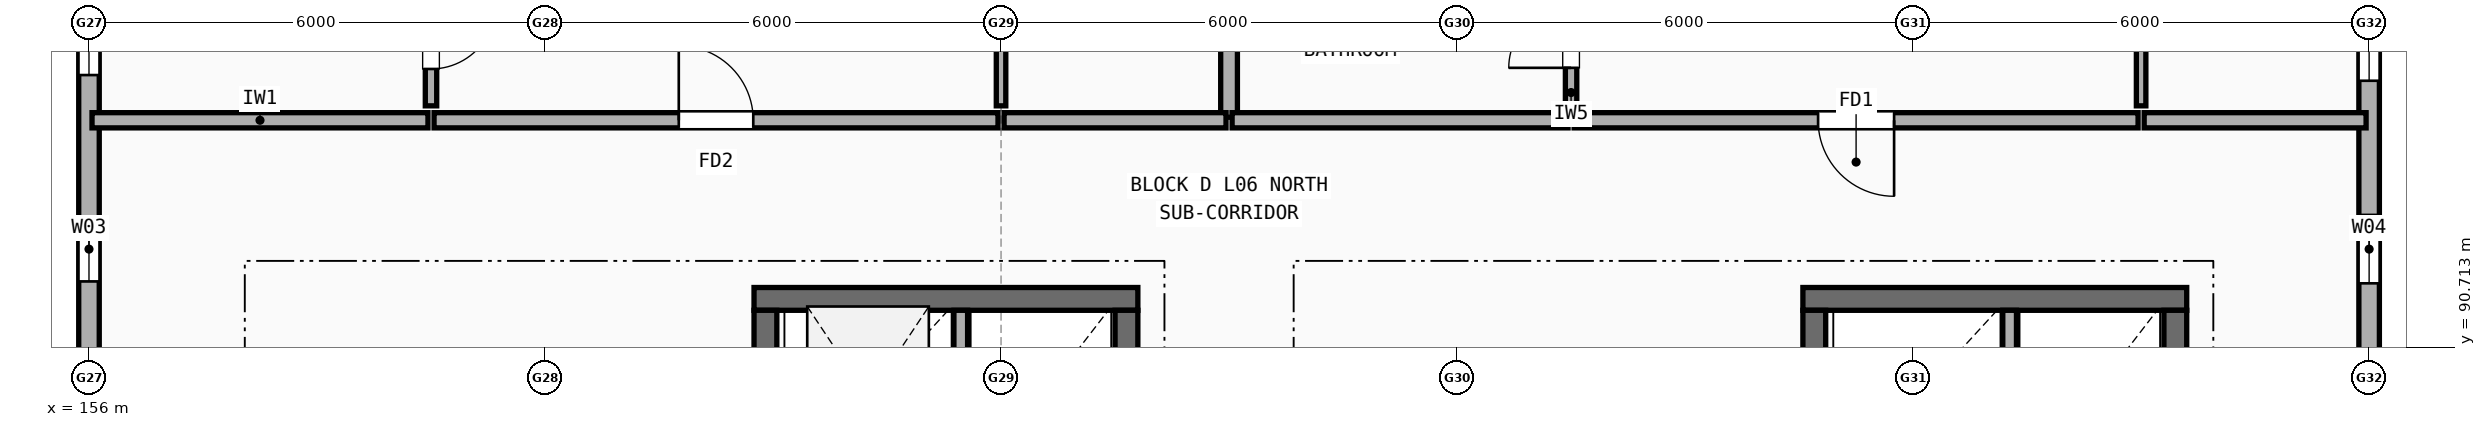
"""IFC4 building model, lengths in metres.
Left out: names, types, materials, properties, quantities, classifications, styles, units other than length and angle.
Written with IfcOpenShell. Run it as: python <this file> out.ifc"""

import sys

from ifc_helpers import new_model, si_unit, direction, frame, frame_2d, origin, place, context, subcontext, project, spatial, rectangle, extrude, element, fill, save


model = new_model("IFC4")
c1 = context("Model", 3, precision=1e-05, world=origin(), true_north=direction((0.0, 1.0)))
c2 = subcontext(c1, "Body", "Model", "MODEL_VIEW")
j1 = project(units=[si_unit("LENGTHUNIT", "METRE"), si_unit("PLANEANGLEUNIT", "RADIAN")], contexts=[c1])
p1 = place(None, origin())
s1 = spatial("IfcSite", under=j1, at=p1, CompositionType="ELEMENT")
p2 = place(p1, origin())
s2 = spatial("IfcBuilding", under=s1, at=p2, CompositionType="ELEMENT")
p3 = place(p2, frame((0.0, 0.0, 20.5)))
s3 = spatial("IfcBuildingStorey", under=s2, at=p3, CompositionType="ELEMENT", Elevation=20.5)
p4 = place(p3, frame((186.0, 90.35, 0.0), z_axis=(0.0, 0.0, 1.0), x_axis=(0.0, 1.0, 0.0)))
e1 = element("IfcWall", 1, at=p4, inside=s3, PredefinedType="STANDARD", context=c2, shape_type="SweptSolid", body=[
    extrude(rectangle(XDim=5.3, YDim=0.27, at=frame_2d((2.65, 0.0))), origin(), (0.0, 0.0, 1.0), 2.452),
])
p5 = place(p4, frame((1.205, 0.0, 0.9)))
e2 = element("IfcOpeningElement", 2, at=p5, cuts=e1, PredefinedType="OPENING", context=c2, shape_type="SweptSolid", body=[
    extrude(rectangle(XDim=0.9, YDim=1.3, at=frame_2d((0.45, 0.65))), frame((0.0, 0.145, 0.0), z_axis=(0.0, -1.0, 0.0), x_axis=(1.0, 0.0, 0.0)), (0.0, 0.0, 1.0), 0.29),
])
p6 = place(p4, frame((3.87, 0.0, 0.9)))
e3 = element("IfcOpeningElement", 3, at=p6, cuts=e1, PredefinedType="OPENING", context=c2, shape_type="SweptSolid", body=[
    extrude(rectangle(XDim=0.95, YDim=1.35, at=frame_2d((0.475, 0.675))), frame((0.0, 0.145, 0.0), z_axis=(0.0, -1.0, 0.0), x_axis=(1.0, 0.0, 0.0)), (0.0, 0.0, 1.0), 0.29),
])
p7 = place(p3, frame((156.0, 95.65, 0.0), z_axis=(0.0, 0.0, 1.0), x_axis=(0.0, -1.0, 0.0)))
e4 = element("IfcWall", 4, at=p7, inside=s3, PredefinedType="STANDARD", context=c2, shape_type="SweptSolid", body=[
    extrude(rectangle(XDim=5.3, YDim=0.27, at=frame_2d((2.65, 0.0))), origin(), (0.0, 0.0, 1.0), 2.452),
])
p8 = place(p7, frame((0.555, 0.0, 0.9)))
e5 = element("IfcOpeningElement", 5, at=p8, cuts=e4, PredefinedType="OPENING", context=c2, shape_type="SweptSolid", body=[
    extrude(rectangle(XDim=0.8, YDim=1.2, at=frame_2d((0.4, 0.6))), frame((0.0, 0.145, 0.0), z_axis=(0.0, -1.0, 0.0), x_axis=(1.0, 0.0, 0.0)), (0.0, 0.0, 1.0), 0.29),
])
p9 = place(p7, frame((3.22, 0.0, 0.9)))
e6 = element("IfcOpeningElement", 6, at=p9, cuts=e4, PredefinedType="OPENING", context=c2, shape_type="SweptSolid", body=[
    extrude(rectangle(XDim=0.85, YDim=1.25, at=frame_2d((0.425, 0.625))), frame((0.0, 0.145, 0.0), z_axis=(0.0, -1.0, 0.0), x_axis=(1.0, 0.0, 0.0)), (0.0, 0.0, 1.0), 0.29),
])
p10 = place(p3, frame((169.8, 91.35, 0.0), z_axis=(0.0, 0.0, 1.0), x_axis=(-1.0, 0.0, 0.0)))
e7 = element("IfcWall", 7, at=p10, inside=s3, PredefinedType="SHEAR", context=c2, shape_type="SweptSolid", body=[
    extrude(rectangle(XDim=5.05, YDim=0.3, at=frame_2d((2.525, 0.0))), origin(), (0.0, 0.0, 1.0), 2.97),
])
p11 = place(p3, frame((169.65, 84.75, 0.0), z_axis=(0.0, 0.0, 1.0), x_axis=(0.0, 1.0, 0.0)))
e8 = element("IfcWall", 8, at=p11, inside=s3, PredefinedType="SHEAR", context=c2, shape_type="SweptSolid", body=[
    extrude(rectangle(XDim=6.45, YDim=0.3, at=frame_2d((3.225, 0.0))), origin(), (0.0, 0.0, 1.0), 2.97),
])
p12 = place(p3, frame((164.9, 87.75, 0.0), z_axis=(0.0, 0.0, 1.0), x_axis=(0.0, 1.0, 0.0)))
e9 = element("IfcWall", 9, at=p12, inside=s3, PredefinedType="SHEAR", context=c2, shape_type="SweptSolid", body=[
    extrude(rectangle(XDim=3.45, YDim=0.3, at=frame_2d((1.725, 0.0))), origin(), (0.0, 0.0, 1.0), 2.97),
])
p13 = place(p3, frame((167.47, 88.94, 0.0), z_axis=(0.0, 0.0, 1.0), x_axis=(0.0, 1.0, 0.0)))
e10 = element("IfcWall", 10, at=p13, inside=s3, PredefinedType="SOLIDWALL", context=c2, shape_type="SweptSolid", body=[
    extrude(rectangle(XDim=2.26, YDim=0.18, at=frame_2d((1.13, 0.0))), origin(), (0.0, 0.0, 1.0), 2.97),
])
p14 = place(p3, frame((183.6, 91.35, 0.0), z_axis=(0.0, 0.0, 1.0), x_axis=(-1.0, 0.0, 0.0)))
e11 = element("IfcWall", 11, at=p14, inside=s3, PredefinedType="SHEAR", context=c2, shape_type="SweptSolid", body=[
    extrude(rectangle(XDim=5.05, YDim=0.3, at=frame_2d((2.525, 0.0))), origin(), (0.0, 0.0, 1.0), 2.97),
])
p15 = place(p3, frame((183.45, 84.75, 0.0), z_axis=(0.0, 0.0, 1.0), x_axis=(0.0, 1.0, 0.0)))
e12 = element("IfcWall", 12, at=p15, inside=s3, PredefinedType="SHEAR", context=c2, shape_type="SweptSolid", body=[
    extrude(rectangle(XDim=6.45, YDim=0.3, at=frame_2d((3.225, 0.0))), origin(), (0.0, 0.0, 1.0), 2.97),
])
p16 = place(p3, frame((178.7, 87.65, 0.0), z_axis=(0.0, 0.0, 1.0), x_axis=(0.0, 1.0, 0.0)))
e13 = element("IfcWall", 13, at=p16, inside=s3, PredefinedType="SHEAR", context=c2, shape_type="SweptSolid", body=[
    extrude(rectangle(XDim=3.55, YDim=0.3, at=frame_2d((1.775, 0.0))), origin(), (0.0, 0.0, 1.0), 2.97),
])
p17 = place(p3, frame((181.27, 88.94, 0.0), z_axis=(0.0, 0.0, 1.0), x_axis=(0.0, 1.0, 0.0)))
e14 = element("IfcWall", 14, at=p17, inside=s3, PredefinedType="SOLIDWALL", context=c2, shape_type="SweptSolid", body=[
    extrude(rectangle(XDim=2.26, YDim=0.18, at=frame_2d((1.13, 0.0))), origin(), (0.0, 0.0, 1.0), 2.97),
])
p18 = place(p3, frame((171.0, 93.74, 0.0), z_axis=(0.0, 0.0, 1.0), x_axis=(0.0, 1.0, 0.0)))
e15 = element("IfcWall", 15, at=p18, inside=s3, PredefinedType="SOLIDWALL", context=c2, shape_type="SweptSolid", body=[
    extrude(rectangle(XDim=7.87, YDim=0.22, at=frame_2d((3.935, 0.0))), origin(), (0.0, 0.0, 1.0), 2.508),
])
p19 = place(p3, frame((156.04, 93.7, 0.0), z_axis=(0.0, 0.0, 1.0), x_axis=(1.0, 0.0, 0.0)))
e16 = element("IfcWall", 16, at=p19, inside=s3, PredefinedType="SOLIDWALL", context=c2, shape_type="SweptSolid", body=[
    extrude(rectangle(XDim=4.42, YDim=0.2, at=frame_2d((2.21, 0.0))), origin(), (0.0, 0.0, 1.0), 2.452),
])
p20 = place(p3, frame((160.54, 93.7, 0.0), z_axis=(0.0, 0.0, 1.0), x_axis=(1.0, 0.0, 0.0)))
e17 = element("IfcWall", 17, at=p20, inside=s3, PredefinedType="SOLIDWALL", context=c2, shape_type="SweptSolid", body=[
    extrude(rectangle(XDim=7.42, YDim=0.2, at=frame_2d((3.71, 0.0))), origin(), (0.0, 0.0, 1.0), 2.508),
])
p21 = place(p20, frame((3.22, 0.0, 0.0)))
e18 = element("IfcOpeningElement", 18, at=p21, cuts=e17, PredefinedType="OPENING", context=c2, shape_type="SweptSolid", body=[
    extrude(rectangle(XDim=0.98, YDim=2.15, at=frame_2d((0.49, 1.075))), frame((0.0, 0.11, 0.0), z_axis=(0.0, -1.0, 0.0), x_axis=(1.0, 0.0, 0.0)), (0.0, 0.0, 1.0), 0.22),
])
p22 = place(p3, frame((160.5, 93.89, 0.0), z_axis=(0.0, 0.0, 1.0), x_axis=(0.0, 1.0, 0.0)))
e19 = element("IfcWall", 19, at=p22, inside=s3, PredefinedType="PARTITIONING", context=c2, shape_type="SweptSolid", body=[
    extrude(rectangle(XDim=1.82, YDim=0.15, at=frame_2d((0.91, 0.0))), origin(), (0.0, 0.0, 1.0), 2.97),
])
p23 = place(p22, frame((0.485, 0.0, 0.0)))
e20 = element("IfcOpeningElement", 20, at=p23, cuts=e19, PredefinedType="OPENING", context=c2, shape_type="SweptSolid", body=[
    extrude(rectangle(XDim=0.85, YDim=2.1, at=frame_2d((0.425, 1.05))), frame((0.0, 0.085, 0.0), z_axis=(0.0, -1.0, 0.0), x_axis=(1.0, 0.0, 0.0)), (0.0, 0.0, 1.0), 0.17),
])
p24 = place(p3, frame((168.04, 93.7, 0.0), z_axis=(0.0, 0.0, 1.0), x_axis=(1.0, 0.0, 0.0)))
e21 = element("IfcWall", 21, at=p24, inside=s3, PredefinedType="SOLIDWALL", context=c2, shape_type="SweptSolid", body=[
    extrude(rectangle(XDim=2.92, YDim=0.2, at=frame_2d((1.46, 0.0))), origin(), (0.0, 0.0, 1.0), 2.508),
])
p25 = place(p3, frame((168.0, 93.89, 0.0), z_axis=(0.0, 0.0, 1.0), x_axis=(0.0, 1.0, 0.0)))
e22 = element("IfcWall", 22, at=p25, inside=s3, PredefinedType="PARTITIONING", context=c2, shape_type="SweptSolid", body=[
    extrude(rectangle(XDim=7.6, YDim=0.125, at=frame_2d((3.8, 0.0))), origin(), (0.0, 0.0, 1.0), 2.508),
])
p26 = place(p25, frame((3.65, 0.0, 0.0)))
e23 = element("IfcOpeningElement", 23, at=p26, cuts=e22, PredefinedType="OPENING", context=c2, shape_type="SweptSolid", body=[
    extrude(rectangle(XDim=0.88, YDim=2.1, at=frame_2d((0.44, 1.05))), frame((0.0, 0.073, 0.0), z_axis=(0.0, -1.0, 0.0), x_axis=(1.0, 0.0, 0.0)), (0.0, 0.0, 1.0), 0.145),
])
p27 = place(p3, frame((171.04, 93.7, 0.0), z_axis=(0.0, 0.0, 1.0), x_axis=(1.0, 0.0, 0.0)))
e24 = element("IfcWall", 24, at=p27, inside=s3, PredefinedType="SOLIDWALL", context=c2, shape_type="SweptSolid", body=[
    extrude(rectangle(XDim=4.42, YDim=0.2, at=frame_2d((2.21, 0.0))), origin(), (0.0, 0.0, 1.0), 2.97),
])
p28 = place(p3, frame((175.54, 93.7, 0.0), z_axis=(0.0, 0.0, 1.0), x_axis=(1.0, 0.0, 0.0)))
e25 = element("IfcWall", 25, at=p28, inside=s3, PredefinedType="SOLIDWALL", context=c2, shape_type="SweptSolid", body=[
    extrude(rectangle(XDim=7.42, YDim=0.2, at=frame_2d((3.71, 0.0))), origin(), (0.0, 0.0, 1.0), 2.97),
])
p29 = place(p28, frame((3.21, 0.0, 0.0)))
e26 = element("IfcOpeningElement", 26, at=p29, cuts=e25, PredefinedType="OPENING", context=c2, shape_type="SweptSolid", body=[
    extrude(rectangle(XDim=1.0, YDim=2.15, at=frame_2d((0.5, 1.075))), frame((0.0, 0.11, 0.0), z_axis=(0.0, -1.0, 0.0), x_axis=(1.0, 0.0, 0.0)), (0.0, 0.0, 1.0), 0.22),
])
p30 = place(p3, frame((175.5, 93.89, 0.0), z_axis=(0.0, 0.0, 1.0), x_axis=(0.0, 1.0, 0.0)))
e27 = element("IfcWall", 27, at=p30, inside=s3, PredefinedType="PARTITIONING", context=c2, shape_type="SweptSolid", body=[
    extrude(rectangle(XDim=1.82, YDim=0.15, at=frame_2d((0.91, 0.0))), origin(), (0.0, 0.0, 1.0), 2.97),
])
p31 = place(p30, frame((0.5, 0.0, 0.0)))
e28 = element("IfcOpeningElement", 28, at=p31, cuts=e27, PredefinedType="OPENING", context=c2, shape_type="SweptSolid", body=[
    extrude(rectangle(XDim=0.82, YDim=2.08, at=frame_2d((0.41, 1.04))), frame((0.0, 0.085, 0.0), z_axis=(0.0, -1.0, 0.0), x_axis=(1.0, 0.0, 0.0)), (0.0, 0.0, 1.0), 0.17),
])
p32 = place(p3, frame((183.04, 93.7, 0.0), z_axis=(0.0, 0.0, 1.0), x_axis=(1.0, 0.0, 0.0)))
e29 = element("IfcWall", 29, at=p32, inside=s3, PredefinedType="SOLIDWALL", context=c2, shape_type="SweptSolid", body=[
    extrude(rectangle(XDim=2.92, YDim=0.2, at=frame_2d((1.46, 0.0))), origin(), (0.0, 0.0, 1.0), 2.452),
])
p33 = place(p3, frame((183.0, 93.89, 0.0), z_axis=(0.0, 0.0, 1.0), x_axis=(0.0, 1.0, 0.0)))
e30 = element("IfcWall", 30, at=p33, inside=s3, PredefinedType="PARTITIONING", context=c2, shape_type="SweptSolid", body=[
    extrude(rectangle(XDim=7.92, YDim=0.125, at=frame_2d((3.96, 0.0))), origin(), (0.0, 0.0, 1.0), 2.548),
])
p34 = place(p33, frame((3.65, 0.0, 0.0)))
e31 = element("IfcOpeningElement", 31, at=p34, cuts=e30, PredefinedType="OPENING", context=c2, shape_type="SweptSolid", body=[
    extrude(rectangle(XDim=0.9, YDim=2.1, at=frame_2d((0.45, 1.05))), frame((0.0, 0.073, 0.0), z_axis=(0.0, -1.0, 0.0), x_axis=(1.0, 0.0, 0.0)), (0.0, 0.0, 1.0), 0.145),
])
p35 = place(p5, origin())
e32 = element("IfcWindow", 32, at=p35, inside=s3, PartitioningType="SINGLE_PANEL", PredefinedType="WINDOW", context=c2, shape_type="SweptSolid", body=[
    extrude(rectangle(XDim=0.9, YDim=1.3, at=frame_2d((0.45, 0.65))), frame((0.0, 0.03, 0.0), z_axis=(0.0, -1.0, 0.0), x_axis=(1.0, 0.0, 0.0)), (0.0, 0.0, 1.0), 0.06),
])
fill(e2, e32)
p36 = place(p6, origin())
e33 = element("IfcWindow", 33, at=p36, inside=s3, PartitioningType="SINGLE_PANEL", PredefinedType="WINDOW", context=c2, shape_type="SweptSolid", body=[
    extrude(rectangle(XDim=0.95, YDim=1.35, at=frame_2d((0.475, 0.675))), frame((0.0, 0.03, 0.0), z_axis=(0.0, -1.0, 0.0), x_axis=(1.0, 0.0, 0.0)), (0.0, 0.0, 1.0), 0.06),
])
fill(e3, e33)
p37 = place(p8, origin())
e34 = element("IfcWindow", 34, at=p37, inside=s3, PartitioningType="SINGLE_PANEL", PredefinedType="WINDOW", context=c2, shape_type="SweptSolid", body=[
    extrude(rectangle(XDim=0.8, YDim=1.2, at=frame_2d((0.4, 0.6))), frame((0.0, 0.03, 0.0), z_axis=(0.0, -1.0, 0.0), x_axis=(1.0, 0.0, 0.0)), (0.0, 0.0, 1.0), 0.06),
])
fill(e5, e34)
p38 = place(p9, origin())
e35 = element("IfcWindow", 35, at=p38, inside=s3, PartitioningType="SINGLE_PANEL", PredefinedType="WINDOW", context=c2, shape_type="SweptSolid", body=[
    extrude(rectangle(XDim=0.85, YDim=1.25, at=frame_2d((0.425, 0.625))), frame((0.0, 0.03, 0.0), z_axis=(0.0, -1.0, 0.0), x_axis=(1.0, 0.0, 0.0)), (0.0, 0.0, 1.0), 0.06),
])
fill(e6, e35)
p39 = place(p21, origin())
e36 = element("IfcDoor", 36, at=p39, inside=s3, OperationType="SINGLE_SWING_LEFT", PredefinedType="DOOR", context=c2, shape_type="SweptSolid", body=[
    extrude(rectangle(XDim=0.98, YDim=2.15, at=frame_2d((0.49, 1.075))), frame((0.0, 0.025, 0.0), z_axis=(0.0, -1.0, 0.0), x_axis=(1.0, 0.0, 0.0)), (0.0, 0.0, 1.0), 0.05),
])
fill(e18, e36)
p40 = place(p23, origin())
e37 = element("IfcDoor", 37, at=p40, inside=s3, OperationType="SINGLE_SWING_RIGHT", PredefinedType="DOOR", context=c2, shape_type="SweptSolid", body=[
    extrude(rectangle(XDim=0.85, YDim=2.1, at=frame_2d((0.425, 1.05))), frame((0.0, 0.025, 0.0), z_axis=(0.0, -1.0, 0.0), x_axis=(1.0, 0.0, 0.0)), (0.0, 0.0, 1.0), 0.05),
])
fill(e20, e37)
p41 = place(p29, origin())
e38 = element("IfcDoor", 38, at=p41, inside=s3, OperationType="SINGLE_SWING_RIGHT", PredefinedType="DOOR", context=c2, shape_type="SweptSolid", body=[
    extrude(rectangle(XDim=1.0, YDim=2.15, at=frame_2d((0.5, 1.075))), frame((0.0, 0.025, 0.0), z_axis=(0.0, -1.0, 0.0), x_axis=(1.0, 0.0, 0.0)), (0.0, 0.0, 1.0), 0.05),
])
fill(e26, e38)
p42 = place(p31, origin())
e39 = element("IfcDoor", 39, at=p42, inside=s3, OperationType="SINGLE_SWING_LEFT", PredefinedType="DOOR", context=c2, shape_type="SweptSolid", body=[
    extrude(rectangle(XDim=0.82, YDim=2.08, at=frame_2d((0.41, 1.04))), frame((0.0, 0.025, 0.0), z_axis=(0.0, -1.0, 0.0), x_axis=(1.0, 0.0, 0.0)), (0.0, 0.0, 1.0), 0.05),
])
fill(e28, e39)
save(model, sys.argv[1])
